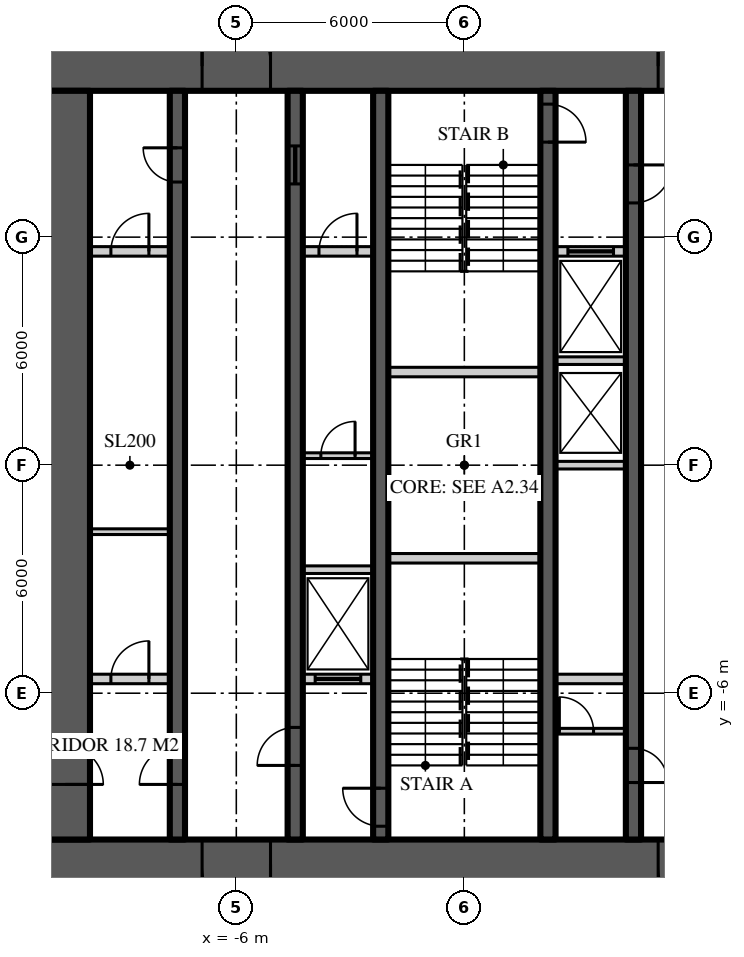
"""IFC4 building model, lengths in metres.
Left out: names, types, materials, properties, quantities, classifications, styles, units other than length and angle.
Written with IfcOpenShell. Run it as: python <this file> out.ifc"""

import sys

from ifc_helpers import new_model, si_unit, direction, frame, frame_2d, origin, place, context, subcontext, project, spatial, rectangle, extrude, element, fill, save


model = new_model("IFC4")
c1 = context("Model", 3, precision=1e-05, world=origin(), true_north=direction((0.0, 1.0)))
c2 = subcontext(c1, "Body", "Model", "MODEL_VIEW")
j1 = project(units=[si_unit("LENGTHUNIT", "METRE"), si_unit("PLANEANGLEUNIT", "RADIAN")], contexts=[c1])
p1 = place(None, origin())
s1 = spatial("IfcSite", under=j1, at=p1, CompositionType="ELEMENT")
p2 = place(p1, origin())
s2 = spatial("IfcBuilding", under=s1, at=p2, CompositionType="ELEMENT")
p3 = place(p2, frame((0.0, 0.0, 259.5)))
s3 = spatial("IfcBuildingStorey", under=s2, at=p3, CompositionType="ELEMENT", Elevation=259.5)
p4 = place(p3, frame((-11.15, 10.5, 0.0), z_axis=(0.0, 0.0, 1.0), x_axis=(1.0, 0.0, 0.0)))
e1 = element("IfcWall", 1, at=p4, inside=s3, PredefinedType="SHEAR", context=c2, shape_type="SweptSolid", body=[
    extrude(rectangle(XDim=22.3, YDim=1.3, at=frame_2d((11.15, 0.0))), origin(), (0.0, 0.0, 1.0), 3.9),
])
p5 = place(p4, frame((4.25, 0.0, 0.0)))
e2 = element("IfcOpeningElement", 2, at=p5, cuts=e1, PredefinedType="OPENING", context=c2, shape_type="SweptSolid", body=[
    extrude(rectangle(XDim=1.8, YDim=2.2, at=frame_2d((0.9, 1.1))), frame((0.0, 0.66, 0.0), z_axis=(0.0, -1.0, 0.0), x_axis=(1.0, 0.0, 0.0)), (0.0, 0.0, 1.0), 1.32),
])
p6 = place(p4, frame((16.25, 0.0, 0.0)))
e3 = element("IfcOpeningElement", 3, at=p6, cuts=e1, PredefinedType="OPENING", context=c2, shape_type="SweptSolid", body=[
    extrude(rectangle(XDim=1.8, YDim=2.2, at=frame_2d((0.9, 1.1))), frame((0.0, 0.66, 0.0), z_axis=(0.0, -1.0, 0.0), x_axis=(1.0, 0.0, 0.0)), (0.0, 0.0, 1.0), 1.32),
])
p7 = place(p3, frame((11.15, -10.5, 0.0), z_axis=(0.0, 0.0, 1.0), x_axis=(-1.0, 0.0, 0.0)))
e4 = element("IfcWall", 4, at=p7, inside=s3, PredefinedType="SHEAR", context=c2, shape_type="SweptSolid", body=[
    extrude(rectangle(XDim=22.3, YDim=1.3, at=frame_2d((11.15, 0.0))), origin(), (0.0, 0.0, 1.0), 3.9),
])
p8 = place(p7, frame((16.25, 0.0, 0.0)))
e5 = element("IfcOpeningElement", 5, at=p8, cuts=e4, PredefinedType="OPENING", context=c2, shape_type="SweptSolid", body=[
    extrude(rectangle(XDim=1.8, YDim=2.2, at=frame_2d((0.9, 1.1))), frame((0.0, 0.66, 0.0), z_axis=(0.0, -1.0, 0.0), x_axis=(1.0, 0.0, 0.0)), (0.0, 0.0, 1.0), 1.32),
])
p9 = place(p7, frame((4.25, 0.0, 0.0)))
e6 = element("IfcOpeningElement", 6, at=p9, cuts=e4, PredefinedType="OPENING", context=c2, shape_type="SweptSolid", body=[
    extrude(rectangle(XDim=1.8, YDim=2.2, at=frame_2d((0.9, 1.1))), frame((0.0, 0.66, 0.0), z_axis=(0.0, -1.0, 0.0), x_axis=(1.0, 0.0, 0.0)), (0.0, 0.0, 1.0), 1.32),
])
p10 = place(p3, frame((-10.5, 9.85, 0.0), z_axis=(0.0, 0.0, 1.0), x_axis=(0.0, -1.0, 0.0)))
e7 = element("IfcWall", 7, at=p10, inside=s3, PredefinedType="SHEAR", context=c2, shape_type="SweptSolid", body=[
    extrude(rectangle(XDim=19.7, YDim=1.3, at=frame_2d((9.85, 0.0))), origin(), (0.0, 0.0, 1.0), 3.9),
])
p11 = place(p10, frame((17.25, 0.0, 0.0)))
e8 = element("IfcOpeningElement", 8, at=p11, cuts=e7, PredefinedType="OPENING", context=c2, shape_type="SweptSolid", body=[
    extrude(rectangle(XDim=1.0, YDim=2.2, at=frame_2d((0.5, 1.1))), frame((0.0, 0.66, 0.0), z_axis=(0.0, -1.0, 0.0), x_axis=(1.0, 0.0, 0.0)), (0.0, 0.0, 1.0), 1.32),
])
p12 = place(p3, frame((-7.55, -9.85, 0.0), z_axis=(0.0, 0.0, 1.0), x_axis=(0.0, 1.0, 0.0)))
e9 = element("IfcWall", 9, at=p12, inside=s3, PredefinedType="SHEAR", context=c2, shape_type="SweptSolid", body=[
    extrude(rectangle(XDim=19.7, YDim=0.4, at=frame_2d((9.85, 0.0))), origin(), (0.0, 0.0, 1.0), 3.9),
])
p13 = place(p12, frame((1.45, 0.0, 0.0)))
e10 = element("IfcOpeningElement", 10, at=p13, cuts=e9, PredefinedType="OPENING", context=c2, shape_type="SweptSolid", body=[
    extrude(rectangle(XDim=1.0, YDim=2.2, at=frame_2d((0.5, 1.1))), frame((0.0, 0.21, 0.0), z_axis=(0.0, -1.0, 0.0), x_axis=(1.0, 0.0, 0.0)), (0.0, 0.0, 1.0), 0.42),
])
p14 = place(p12, frame((17.3, 0.0, 0.0)))
e11 = element("IfcOpeningElement", 11, at=p14, cuts=e9, PredefinedType="OPENING", context=c2, shape_type="SweptSolid", body=[
    extrude(rectangle(XDim=0.9, YDim=2.1, at=frame_2d((0.45, 1.05))), frame((0.0, 0.21, 0.0), z_axis=(0.0, -1.0, 0.0), x_axis=(1.0, 0.0, 0.0)), (0.0, 0.0, 1.0), 0.42),
])
p15 = place(p3, frame((-4.45, -9.85, 0.0), z_axis=(0.0, 0.0, 1.0), x_axis=(0.0, 1.0, 0.0)))
e12 = element("IfcWall", 12, at=p15, inside=s3, PredefinedType="SHEAR", context=c2, shape_type="SweptSolid", body=[
    extrude(rectangle(XDim=19.7, YDim=0.4, at=frame_2d((9.85, 0.0))), origin(), (0.0, 0.0, 1.0), 3.9),
])
p16 = place(p15, frame((1.95, 0.0, 0.0)))
e13 = element("IfcOpeningElement", 13, at=p16, cuts=e12, PredefinedType="OPENING", context=c2, shape_type="SweptSolid", body=[
    extrude(rectangle(XDim=1.0, YDim=2.2, at=frame_2d((0.5, 1.1))), frame((0.0, 0.21, 0.0), z_axis=(0.0, -1.0, 0.0), x_axis=(1.0, 0.0, 0.0)), (0.0, 0.0, 1.0), 0.42),
])
p17 = place(p15, frame((17.25, 0.0, 0.0)))
e14 = element("IfcOpeningElement", 14, at=p17, cuts=e12, PredefinedType="OPENING", context=c2, shape_type="SweptSolid", body=[
    extrude(rectangle(XDim=1.0, YDim=2.1, at=frame_2d((0.5, 1.05))), frame((0.0, 0.21, 0.0), z_axis=(0.0, -1.0, 0.0), x_axis=(1.0, 0.0, 0.0)), (0.0, 0.0, 1.0), 0.42),
])
p18 = place(p3, frame((4.45, 9.85, 0.0), z_axis=(0.0, 0.0, 1.0), x_axis=(0.0, -1.0, 0.0)))
e15 = element("IfcWall", 15, at=p18, inside=s3, PredefinedType="SHEAR", context=c2, shape_type="SweptSolid", body=[
    extrude(rectangle(XDim=19.7, YDim=0.4, at=frame_2d((9.85, 0.0))), origin(), (0.0, 0.0, 1.0), 3.9),
])
p19 = place(p18, frame((1.95, 0.0, 0.0)))
e16 = element("IfcOpeningElement", 16, at=p19, cuts=e15, PredefinedType="OPENING", context=c2, shape_type="SweptSolid", body=[
    extrude(rectangle(XDim=1.0, YDim=2.2, at=frame_2d((0.5, 1.1))), frame((0.0, 0.21, 0.0), z_axis=(0.0, -1.0, 0.0), x_axis=(1.0, 0.0, 0.0)), (0.0, 0.0, 1.0), 0.42),
])
p20 = place(p18, frame((17.3, 0.0, 0.0)))
e17 = element("IfcOpeningElement", 17, at=p20, cuts=e15, PredefinedType="OPENING", context=c2, shape_type="SweptSolid", body=[
    extrude(rectangle(XDim=0.9, YDim=2.1, at=frame_2d((0.45, 1.05))), frame((0.0, 0.21, 0.0), z_axis=(0.0, -1.0, 0.0), x_axis=(1.0, 0.0, 0.0)), (0.0, 0.0, 1.0), 0.42),
])
p21 = place(p3, frame((-2.2, -9.85, 0.0), z_axis=(0.0, 0.0, 1.0), x_axis=(0.0, 1.0, 0.0)))
e18 = element("IfcWall", 18, at=p21, inside=s3, PredefinedType="SHEAR", context=c2, shape_type="SweptSolid", body=[
    extrude(rectangle(XDim=19.7, YDim=0.4, at=frame_2d((9.85, 0.0))), origin(), (0.0, 0.0, 1.0), 3.9),
])
p22 = place(p21, frame((0.35, 0.0, 0.0)))
e19 = element("IfcOpeningElement", 19, at=p22, cuts=e18, PredefinedType="OPENING", context=c2, shape_type="SweptSolid", body=[
    extrude(rectangle(XDim=1.0, YDim=2.2, at=frame_2d((0.5, 1.1))), frame((0.0, 0.21, 0.0), z_axis=(0.0, -1.0, 0.0), x_axis=(1.0, 0.0, 0.0)), (0.0, 0.0, 1.0), 0.42),
])
p23 = place(p3, frame((2.2, 9.85, 0.0), z_axis=(0.0, 0.0, 1.0), x_axis=(0.0, -1.0, 0.0)))
e20 = element("IfcWall", 20, at=p23, inside=s3, PredefinedType="SHEAR", context=c2, shape_type="SweptSolid", body=[
    extrude(rectangle(XDim=19.7, YDim=0.4, at=frame_2d((9.85, 0.0))), origin(), (0.0, 0.0, 1.0), 3.9),
])
p24 = place(p23, frame((0.35, 0.0, 0.0)))
e21 = element("IfcOpeningElement", 21, at=p24, cuts=e20, PredefinedType="OPENING", context=c2, shape_type="SweptSolid", body=[
    extrude(rectangle(XDim=1.0, YDim=2.2, at=frame_2d((0.5, 1.1))), frame((0.0, 0.21, 0.0), z_axis=(0.0, -1.0, 0.0), x_axis=(1.0, 0.0, 0.0)), (0.0, 0.0, 1.0), 0.42),
])
p25 = place(p3, frame((-9.85, 5.625, 0.0), z_axis=(0.0, 0.0, 1.0), x_axis=(1.0, 0.0, 0.0)))
e22 = element("IfcWall", 22, at=p25, inside=s3, PredefinedType="SOLIDWALL", context=c2, shape_type="SweptSolid", body=[
    extrude(rectangle(XDim=2.1, YDim=0.25, at=frame_2d((1.05, 0.0))), origin(), (0.0, 0.0, 1.0), 3.7),
])
p26 = place(p25, frame((0.55, 0.0, 0.0)))
e23 = element("IfcOpeningElement", 23, at=p26, cuts=e22, PredefinedType="OPENING", context=c2, shape_type="SweptSolid", body=[
    extrude(rectangle(XDim=1.0, YDim=2.2, at=frame_2d((0.5, 1.1))), frame((0.0, 0.135, 0.0), z_axis=(0.0, -1.0, 0.0), x_axis=(1.0, 0.0, 0.0)), (0.0, 0.0, 1.0), 0.27),
])
p27 = place(p3, frame((-4.25, 5.625, 0.0), z_axis=(0.0, 0.0, 1.0), x_axis=(1.0, 0.0, 0.0)))
e24 = element("IfcWall", 24, at=p27, inside=s3, PredefinedType="SOLIDWALL", context=c2, shape_type="SweptSolid", body=[
    extrude(rectangle(XDim=1.85, YDim=0.25, at=frame_2d((0.925, 0.0))), origin(), (0.0, 0.0, 1.0), 3.7),
])
p28 = place(p27, frame((0.425, 0.0, 0.0)))
e25 = element("IfcOpeningElement", 25, at=p28, cuts=e24, PredefinedType="OPENING", context=c2, shape_type="SweptSolid", body=[
    extrude(rectangle(XDim=1.0, YDim=2.2, at=frame_2d((0.5, 1.1))), frame((0.0, 0.135, 0.0), z_axis=(0.0, -1.0, 0.0), x_axis=(1.0, 0.0, 0.0)), (0.0, 0.0, 1.0), 0.27),
])
p29 = place(p3, frame((2.4, 5.625, 0.0), z_axis=(0.0, 0.0, 1.0), x_axis=(1.0, 0.0, 0.0)))
e26 = element("IfcWall", 26, at=p29, inside=s3, PredefinedType="SOLIDWALL", context=c2, shape_type="SweptSolid", body=[
    extrude(rectangle(XDim=1.85, YDim=0.25, at=frame_2d((0.925, 0.0))), origin(), (0.0, 0.0, 1.0), 3.7),
])
p30 = place(p29, frame((0.325, 0.0, 0.0)))
e27 = element("IfcOpeningElement", 27, at=p30, cuts=e26, PredefinedType="OPENING", context=c2, shape_type="SweptSolid", body=[
    extrude(rectangle(XDim=1.2, YDim=2.2, at=frame_2d((0.6, 1.1))), frame((0.0, 0.135, 0.0), z_axis=(0.0, -1.0, 0.0), x_axis=(1.0, 0.0, 0.0)), (0.0, 0.0, 1.0), 0.27),
])
p31 = place(p3, frame((-9.85, -5.625, 0.0), z_axis=(0.0, 0.0, 1.0), x_axis=(1.0, 0.0, 0.0)))
e28 = element("IfcWall", 28, at=p31, inside=s3, PredefinedType="SOLIDWALL", context=c2, shape_type="SweptSolid", body=[
    extrude(rectangle(XDim=2.1, YDim=0.25, at=frame_2d((1.05, 0.0))), origin(), (0.0, 0.0, 1.0), 3.7),
])
p32 = place(p31, frame((0.55, 0.0, 0.0)))
e29 = element("IfcOpeningElement", 29, at=p32, cuts=e28, PredefinedType="OPENING", context=c2, shape_type="SweptSolid", body=[
    extrude(rectangle(XDim=1.0, YDim=2.2, at=frame_2d((0.5, 1.1))), frame((0.0, 0.135, 0.0), z_axis=(0.0, -1.0, 0.0), x_axis=(1.0, 0.0, 0.0)), (0.0, 0.0, 1.0), 0.27),
])
p33 = place(p3, frame((-4.25, -5.625, 0.0), z_axis=(0.0, 0.0, 1.0), x_axis=(1.0, 0.0, 0.0)))
e30 = element("IfcWall", 30, at=p33, inside=s3, PredefinedType="SOLIDWALL", context=c2, shape_type="SweptSolid", body=[
    extrude(rectangle(XDim=1.85, YDim=0.25, at=frame_2d((0.925, 0.0))), origin(), (0.0, 0.0, 1.0), 3.7),
])
p34 = place(p33, frame((0.325, 0.0, 0.0)))
e31 = element("IfcOpeningElement", 31, at=p34, cuts=e30, PredefinedType="OPENING", context=c2, shape_type="SweptSolid", body=[
    extrude(rectangle(XDim=1.2, YDim=2.2, at=frame_2d((0.6, 1.1))), frame((0.0, 0.135, 0.0), z_axis=(0.0, -1.0, 0.0), x_axis=(1.0, 0.0, 0.0)), (0.0, 0.0, 1.0), 0.27),
])
p35 = place(p3, frame((2.4, -5.625, 0.0), z_axis=(0.0, 0.0, 1.0), x_axis=(1.0, 0.0, 0.0)))
e32 = element("IfcWall", 32, at=p35, inside=s3, PredefinedType="SOLIDWALL", context=c2, shape_type="SweptSolid", body=[
    extrude(rectangle(XDim=1.85, YDim=0.25, at=frame_2d((0.925, 0.0))), origin(), (0.0, 0.0, 1.0), 3.7),
])
for number, where, z_axis, x_axis in (
    (33, (-2.0, -2.45, 0.0), (0.0, 0.0, 1.0), (1.0, 0.0, 0.0)),
    (34, (-2.0, 2.45, 0.0), (0.0, 0.0, 1.0), (1.0, 0.0, 0.0)),
):
    element("IfcWall", number, at=place(p3, frame(where, z_axis=z_axis, x_axis=x_axis)), inside=s3, PredefinedType="SOLIDWALL", context=c2, shape_type="SweptSolid", body=[
        extrude(rectangle(XDim=4.0, YDim=0.25, at=frame_2d((2.0, 0.0))), origin(), (0.0, 0.0, 1.0), 3.7),
    ])
for number, where, z_axis, x_axis in (
    (35, (-4.25, -2.75, 0.0), (0.0, 0.0, 1.0), (1.0, 0.0, 0.0)),
    (36, (2.4, 0.0, 0.0), (0.0, 0.0, 1.0), (1.0, 0.0, 0.0)),
    (37, (2.4, 2.75, 0.0), (0.0, 0.0, 1.0), (1.0, 0.0, 0.0)),
):
    element("IfcWall", number, at=place(p3, frame(where, z_axis=z_axis, x_axis=x_axis)), inside=s3, PredefinedType="SOLIDWALL", context=c2, shape_type="SweptSolid", body=[
        extrude(rectangle(XDim=1.85, YDim=0.2, at=frame_2d((0.925, 0.0))), origin(), (0.0, 0.0, 1.0), 3.7),
    ])
p36 = place(p3, frame((-9.85, -1.75, 0.0), z_axis=(0.0, 0.0, 1.0), x_axis=(1.0, 0.0, 0.0)))
e38 = element("IfcWall", 38, at=p36, inside=s3, PredefinedType="SOLIDWALL", context=c2, shape_type="SweptSolid", body=[
    extrude(rectangle(XDim=2.1, YDim=0.15, at=frame_2d((1.05, 0.0))), origin(), (0.0, 0.0, 1.0), 3.77),
])
p37 = place(p3, frame((-4.25, 0.25, 0.0), z_axis=(0.0, 0.0, 1.0), x_axis=(1.0, 0.0, 0.0)))
e39 = element("IfcWall", 39, at=p37, inside=s3, PredefinedType="SOLIDWALL", context=c2, shape_type="SweptSolid", body=[
    extrude(rectangle(XDim=1.85, YDim=0.15, at=frame_2d((0.925, 0.0))), origin(), (0.0, 0.0, 1.0), 3.77),
])
p38 = place(p37, frame((0.475, 0.0, 0.0)))
e40 = element("IfcOpeningElement", 40, at=p38, cuts=e39, PredefinedType="OPENING", context=c2, shape_type="SweptSolid", body=[
    extrude(rectangle(XDim=0.9, YDim=2.1, at=frame_2d((0.45, 1.05))), frame((0.0, 0.085, 0.0), z_axis=(0.0, -1.0, 0.0), x_axis=(1.0, 0.0, 0.0)), (0.0, 0.0, 1.0), 0.17),
])
p39 = place(p3, frame((2.4, -7.0, 0.0), z_axis=(0.0, 0.0, 1.0), x_axis=(1.0, 0.0, 0.0)))
e41 = element("IfcWall", 41, at=p39, inside=s3, PredefinedType="SOLIDWALL", context=c2, shape_type="SweptSolid", body=[
    extrude(rectangle(XDim=1.85, YDim=0.15, at=frame_2d((0.925, 0.0))), origin(), (0.0, 0.0, 1.0), 3.77),
])
p40 = place(p39, frame((0.1, 0.0, 0.0)))
e42 = element("IfcOpeningElement", 42, at=p40, cuts=e41, PredefinedType="OPENING", context=c2, shape_type="SweptSolid", body=[
    extrude(rectangle(XDim=0.9, YDim=2.1, at=frame_2d((0.45, 1.05))), frame((0.0, 0.085, 0.0), z_axis=(0.0, -1.0, 0.0), x_axis=(1.0, 0.0, 0.0)), (0.0, 0.0, 1.0), 0.17),
])
p41 = place(p5, origin())
e43 = element("IfcDoor", 43, at=p41, inside=s3, OperationType="DOUBLE_DOOR_DOUBLE_SWING", PredefinedType="DOOR", context=c2, shape_type="SweptSolid", body=[
    extrude(rectangle(XDim=1.8, YDim=2.2, at=frame_2d((0.9, 1.1))), frame((0.0, 0.025, 0.0), z_axis=(0.0, -1.0, 0.0), x_axis=(1.0, 0.0, 0.0)), (0.0, 0.0, 1.0), 0.05),
])
fill(e2, e43)
p42 = place(p8, origin())
e44 = element("IfcDoor", 44, at=p42, inside=s3, OperationType="DOUBLE_DOOR_DOUBLE_SWING", PredefinedType="DOOR", context=c2, shape_type="SweptSolid", body=[
    extrude(rectangle(XDim=1.8, YDim=2.2, at=frame_2d((0.9, 1.1))), frame((0.0, 0.025, 0.0), z_axis=(0.0, -1.0, 0.0), x_axis=(1.0, 0.0, 0.0)), (0.0, 0.0, 1.0), 0.05),
])
fill(e5, e44)
p43 = place(p6, origin())
e45 = element("IfcDoor", 45, at=p43, inside=s3, OperationType="DOUBLE_DOOR_DOUBLE_SWING", PredefinedType="DOOR", context=c2, shape_type="SweptSolid", body=[
    extrude(rectangle(XDim=1.8, YDim=2.2, at=frame_2d((0.9, 1.1))), frame((0.0, 0.025, 0.0), z_axis=(0.0, -1.0, 0.0), x_axis=(1.0, 0.0, 0.0)), (0.0, 0.0, 1.0), 0.05),
])
fill(e3, e45)
p44 = place(p9, origin())
e46 = element("IfcDoor", 46, at=p44, inside=s3, OperationType="DOUBLE_DOOR_DOUBLE_SWING", PredefinedType="DOOR", context=c2, shape_type="SweptSolid", body=[
    extrude(rectangle(XDim=1.8, YDim=2.2, at=frame_2d((0.9, 1.1))), frame((0.0, 0.025, 0.0), z_axis=(0.0, -1.0, 0.0), x_axis=(1.0, 0.0, 0.0)), (0.0, 0.0, 1.0), 0.05),
])
fill(e6, e46)
p45 = place(p13, origin())
e47 = element("IfcDoor", 47, at=p45, inside=s3, OperationType="SINGLE_SWING_LEFT", PredefinedType="DOOR", context=c2, shape_type="SweptSolid", body=[
    extrude(rectangle(XDim=1.0, YDim=2.2, at=frame_2d((0.5, 1.1))), frame((0.0, 0.025, 0.0), z_axis=(0.0, -1.0, 0.0), x_axis=(1.0, 0.0, 0.0)), (0.0, 0.0, 1.0), 0.05),
])
fill(e10, e47)
p46 = place(p11, origin())
e48 = element("IfcDoor", 48, at=p46, inside=s3, OperationType="SINGLE_SWING_RIGHT", PredefinedType="DOOR", context=c2, shape_type="SweptSolid", body=[
    extrude(rectangle(XDim=1.0, YDim=2.2, at=frame_2d((0.5, 1.1))), frame((0.0, 0.025, 0.0), z_axis=(0.0, -1.0, 0.0), x_axis=(1.0, 0.0, 0.0)), (0.0, 0.0, 1.0), 0.05),
])
fill(e8, e48)
p47 = place(p16, origin())
e49 = element("IfcDoor", 49, at=p47, inside=s3, OperationType="SINGLE_SWING_LEFT", PredefinedType="DOOR", context=c2, shape_type="SweptSolid", body=[
    extrude(rectangle(XDim=1.0, YDim=2.2, at=frame_2d((0.5, 1.1))), frame((0.0, 0.025, 0.0), z_axis=(0.0, -1.0, 0.0), x_axis=(1.0, 0.0, 0.0)), (0.0, 0.0, 1.0), 0.05),
])
fill(e13, e49)
p48 = place(p22, origin())
e50 = element("IfcDoor", 50, at=p48, inside=s3, OperationType="SINGLE_SWING_RIGHT", PredefinedType="DOOR", context=c2, shape_type="SweptSolid", body=[
    extrude(rectangle(XDim=1.0, YDim=2.2, at=frame_2d((0.5, 1.1))), frame((0.0, 0.025, 0.0), z_axis=(0.0, -1.0, 0.0), x_axis=(1.0, 0.0, 0.0)), (0.0, 0.0, 1.0), 0.05),
])
fill(e19, e50)
p49 = place(p19, origin())
e51 = element("IfcDoor", 51, at=p49, inside=s3, OperationType="SINGLE_SWING_LEFT", PredefinedType="DOOR", context=c2, shape_type="SweptSolid", body=[
    extrude(rectangle(XDim=1.0, YDim=2.2, at=frame_2d((0.5, 1.1))), frame((0.0, 0.025, 0.0), z_axis=(0.0, -1.0, 0.0), x_axis=(1.0, 0.0, 0.0)), (0.0, 0.0, 1.0), 0.05),
])
fill(e16, e51)
p50 = place(p24, origin())
e52 = element("IfcDoor", 52, at=p50, inside=s3, OperationType="SINGLE_SWING_RIGHT", PredefinedType="DOOR", context=c2, shape_type="SweptSolid", body=[
    extrude(rectangle(XDim=1.0, YDim=2.2, at=frame_2d((0.5, 1.1))), frame((0.0, 0.025, 0.0), z_axis=(0.0, -1.0, 0.0), x_axis=(1.0, 0.0, 0.0)), (0.0, 0.0, 1.0), 0.05),
])
fill(e21, e52)
p51 = place(p14, origin())
e53 = element("IfcDoor", 53, at=p51, inside=s3, OperationType="SINGLE_SWING_RIGHT", PredefinedType="DOOR", context=c2, shape_type="SweptSolid", body=[
    extrude(rectangle(XDim=0.9, YDim=2.1, at=frame_2d((0.45, 1.05))), frame((0.0, 0.025, 0.0), z_axis=(0.0, -1.0, 0.0), x_axis=(1.0, 0.0, 0.0)), (0.0, 0.0, 1.0), 0.05),
])
fill(e11, e53)
p52 = place(p17, origin())
e54 = element("IfcDoor", 54, at=p52, inside=s3, OperationType="SLIDING_TO_LEFT", PredefinedType="DOOR", context=c2, shape_type="SweptSolid", body=[
    extrude(rectangle(XDim=1.0, YDim=2.1, at=frame_2d((0.5, 1.05))), frame((0.0, 0.025, 0.0), z_axis=(0.0, -1.0, 0.0), x_axis=(1.0, 0.0, 0.0)), (0.0, 0.0, 1.0), 0.05),
])
fill(e14, e54)
p53 = place(p20, origin())
e55 = element("IfcDoor", 55, at=p53, inside=s3, OperationType="SINGLE_SWING_RIGHT", PredefinedType="DOOR", context=c2, shape_type="SweptSolid", body=[
    extrude(rectangle(XDim=0.9, YDim=2.1, at=frame_2d((0.45, 1.05))), frame((0.0, 0.025, 0.0), z_axis=(0.0, -1.0, 0.0), x_axis=(1.0, 0.0, 0.0)), (0.0, 0.0, 1.0), 0.05),
])
fill(e17, e55)
p54 = place(p34, origin())
e56 = element("IfcDoor", 56, at=p54, inside=s3, OperationType="SLIDING_TO_LEFT", PredefinedType="DOOR", context=c2, shape_type="SweptSolid", body=[
    extrude(rectangle(XDim=1.2, YDim=2.2, at=frame_2d((0.6, 1.1))), frame((0.0, 0.025, 0.0), z_axis=(0.0, -1.0, 0.0), x_axis=(1.0, 0.0, 0.0)), (0.0, 0.0, 1.0), 0.05),
])
fill(e31, e56)
p55 = place(p30, origin())
e57 = element("IfcDoor", 57, at=p55, inside=s3, OperationType="SLIDING_TO_LEFT", PredefinedType="DOOR", context=c2, shape_type="SweptSolid", body=[
    extrude(rectangle(XDim=1.2, YDim=2.2, at=frame_2d((0.6, 1.1))), frame((0.0, 0.025, 0.0), z_axis=(0.0, -1.0, 0.0), x_axis=(1.0, 0.0, 0.0)), (0.0, 0.0, 1.0), 0.05),
])
fill(e27, e57)
p56 = place(p26, origin())
e58 = element("IfcDoor", 58, at=p56, inside=s3, OperationType="SINGLE_SWING_RIGHT", PredefinedType="DOOR", context=c2, shape_type="SweptSolid", body=[
    extrude(rectangle(XDim=1.0, YDim=2.2, at=frame_2d((0.5, 1.1))), frame((0.0, 0.025, 0.0), z_axis=(0.0, -1.0, 0.0), x_axis=(1.0, 0.0, 0.0)), (0.0, 0.0, 1.0), 0.05),
])
fill(e23, e58)
p57 = place(p32, origin())
e59 = element("IfcDoor", 59, at=p57, inside=s3, OperationType="SINGLE_SWING_RIGHT", PredefinedType="DOOR", context=c2, shape_type="SweptSolid", body=[
    extrude(rectangle(XDim=1.0, YDim=2.2, at=frame_2d((0.5, 1.1))), frame((0.0, 0.025, 0.0), z_axis=(0.0, -1.0, 0.0), x_axis=(1.0, 0.0, 0.0)), (0.0, 0.0, 1.0), 0.05),
])
fill(e29, e59)
p58 = place(p38, origin())
e60 = element("IfcDoor", 60, at=p58, inside=s3, OperationType="SINGLE_SWING_RIGHT", PredefinedType="DOOR", context=c2, shape_type="SweptSolid", body=[
    extrude(rectangle(XDim=0.9, YDim=2.1, at=frame_2d((0.45, 1.05))), frame((0.0, 0.025, 0.0), z_axis=(0.0, -1.0, 0.0), x_axis=(1.0, 0.0, 0.0)), (0.0, 0.0, 1.0), 0.05),
])
fill(e40, e60)
p59 = place(p28, origin())
e61 = element("IfcDoor", 61, at=p59, inside=s3, OperationType="SINGLE_SWING_RIGHT", PredefinedType="DOOR", context=c2, shape_type="SweptSolid", body=[
    extrude(rectangle(XDim=1.0, YDim=2.2, at=frame_2d((0.5, 1.1))), frame((0.0, 0.025, 0.0), z_axis=(0.0, -1.0, 0.0), x_axis=(1.0, 0.0, 0.0)), (0.0, 0.0, 1.0), 0.05),
])
fill(e25, e61)
p60 = place(p40, origin())
e62 = element("IfcDoor", 62, at=p60, inside=s3, OperationType="SINGLE_SWING_LEFT", PredefinedType="DOOR", context=c2, shape_type="SweptSolid", body=[
    extrude(rectangle(XDim=0.9, YDim=2.1, at=frame_2d((0.45, 1.05))), frame((0.0, 0.025, 0.0), z_axis=(0.0, -1.0, 0.0), x_axis=(1.0, 0.0, 0.0)), (0.0, 0.0, 1.0), 0.05),
])
fill(e42, e62)
save(model, sys.argv[1])
